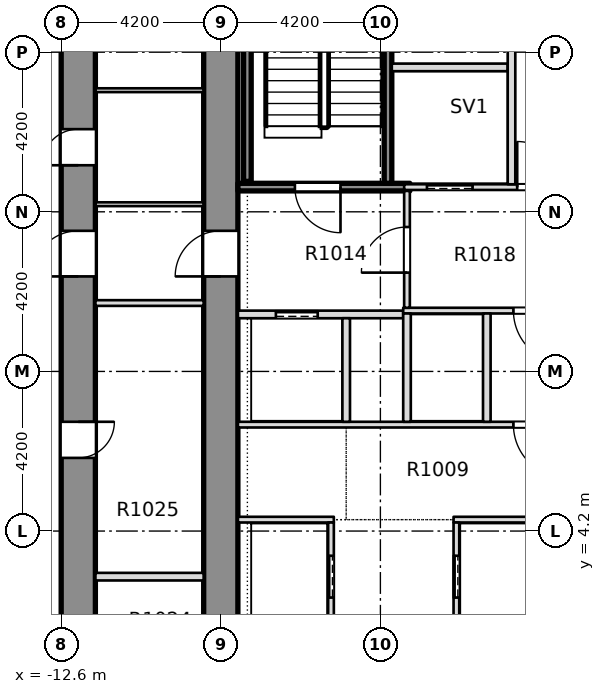
"""IFC4 building model, lengths in metres.
Left out: names, types, materials, properties, quantities, classifications, styles, units other than length and angle.
Written with IfcOpenShell. Run it as: python <this file> out.ifc"""

import sys

from ifc_helpers import new_model, si_unit, direction, frame, frame_2d, origin, place, context, subcontext, project, spatial, rectangle, extrude, element, fill, save


model = new_model("IFC4")
c1 = context("Model", 3, precision=1e-05, world=origin(), true_north=direction((0.0, 1.0)))
c2 = subcontext(c1, "Body", "Model", "MODEL_VIEW")
j1 = project(units=[si_unit("LENGTHUNIT", "METRE"), si_unit("PLANEANGLEUNIT", "RADIAN")], contexts=[c1])
p1 = place(None, origin())
s1 = spatial("IfcSite", under=j1, at=p1, CompositionType="ELEMENT")
p2 = place(p1, origin())
s2 = spatial("IfcBuilding", under=s1, at=p2, CompositionType="ELEMENT")
p3 = place(p2, frame((0.0, 0.0, 48.3)))
s3 = spatial("IfcBuildingStorey", under=s2, at=p3, CompositionType="ELEMENT", Elevation=48.3)
p4 = place(p3, frame((-12.15, -8.4, -0.32), z_axis=(0.0, 0.0, 1.0), x_axis=(0.0, 1.0, 0.0)))
e1 = element("IfcWall", 1, at=p4, inside=s3, PredefinedType="SHEAR", context=c2, shape_type="SweptSolid", body=[
    extrude(rectangle(XDim=30.15, YDim=0.9, at=frame_2d((15.075, 0.0))), origin(), (0.0, 0.0, 1.0), 3.45),
])
p5 = place(p4, frame((3.925, 0.0, 0.32)))
e2 = element("IfcOpeningElement", 2, at=p5, cuts=e1, PredefinedType="OPENING", context=c2, shape_type="SweptSolid", body=[
    extrude(rectangle(XDim=0.95, YDim=2.1, at=frame_2d((0.475, 1.05))), frame((0.0, 0.46, 0.0), z_axis=(0.0, -1.0, 0.0), x_axis=(1.0, 0.0, 0.0)), (0.0, 0.0, 1.0), 0.92),
])
p6 = place(p4, frame((9.175, 0.0, 0.32)))
e3 = element("IfcOpeningElement", 3, at=p6, cuts=e1, PredefinedType="OPENING", context=c2, shape_type="SweptSolid", body=[
    extrude(rectangle(XDim=0.95, YDim=2.1, at=frame_2d((0.475, 1.05))), frame((0.0, 0.46, 0.0), z_axis=(0.0, -1.0, 0.0), x_axis=(1.0, 0.0, 0.0)), (0.0, 0.0, 1.0), 0.92),
])
p7 = place(p4, frame((14.525, 0.0, 0.32)))
e4 = element("IfcOpeningElement", 4, at=p7, cuts=e1, PredefinedType="OPENING", context=c2, shape_type="SweptSolid", body=[
    extrude(rectangle(XDim=0.95, YDim=2.1, at=frame_2d((0.475, 1.05))), frame((0.0, 0.46, 0.0), z_axis=(0.0, -1.0, 0.0), x_axis=(1.0, 0.0, 0.0)), (0.0, 0.0, 1.0), 0.92),
])
p8 = place(p4, frame((22.225, 0.0, 0.32)))
e5 = element("IfcOpeningElement", 5, at=p8, cuts=e1, PredefinedType="OPENING", context=c2, shape_type="SweptSolid", body=[
    extrude(rectangle(XDim=0.95, YDim=2.1, at=frame_2d((0.475, 1.05))), frame((0.0, 0.46, 0.0), z_axis=(0.0, -1.0, 0.0), x_axis=(1.0, 0.0, 0.0)), (0.0, 0.0, 1.0), 0.92),
])
p9 = place(p4, frame((26.25, 0.0, 0.32)))
e6 = element("IfcOpeningElement", 6, at=p9, cuts=e1, PredefinedType="OPENING", context=c2, shape_type="SweptSolid", body=[
    extrude(rectangle(XDim=0.95, YDim=2.1, at=frame_2d((0.475, 1.05))), frame((0.0, 0.46, 0.0), z_axis=(0.0, -1.0, 0.0), x_axis=(1.0, 0.0, 0.0)), (0.0, 0.0, 1.0), 0.92),
])
p10 = place(p4, frame((19.3, 0.0, 0.32)))
e7 = element("IfcOpeningElement", 7, at=p10, cuts=e1, PredefinedType="OPENING", context=c2, shape_type="SweptSolid", body=[
    extrude(rectangle(XDim=1.2, YDim=2.1, at=frame_2d((0.6, 1.05))), frame((0.0, 0.46, 0.0), z_axis=(0.0, -1.0, 0.0), x_axis=(1.0, 0.0, 0.0)), (0.0, 0.0, 1.0), 0.92),
])
p11 = place(p3, frame((-8.4, -7.5, -0.32), z_axis=(0.0, 0.0, 1.0), x_axis=(0.0, 1.0, 0.0)))
e8 = element("IfcWall", 8, at=p11, inside=s3, PredefinedType="SHEAR", context=c2, shape_type="SweptSolid", body=[
    extrude(rectangle(XDim=28.35, YDim=0.9, at=frame_2d((14.175, 0.0))), origin(), (0.0, 0.0, 1.0), 3.45),
])
p12 = place(p11, frame((18.4, 0.0, 0.32)))
e9 = element("IfcOpeningElement", 9, at=p12, cuts=e8, PredefinedType="OPENING", context=c2, shape_type="SweptSolid", body=[
    extrude(rectangle(XDim=1.2, YDim=2.1, at=frame_2d((0.6, 1.05))), frame((0.0, 0.46, 0.0), z_axis=(0.0, -1.0, 0.0), x_axis=(1.0, 0.0, 0.0)), (0.0, 0.0, 1.0), 0.92),
])
p13 = place(p3, frame((-7.949, 4.5, 0.0), z_axis=(0.0, 0.0, 1.0), x_axis=(1.0, 0.0, 0.0)))
e10 = element("IfcWall", 10, at=p13, inside=s3, PredefinedType="PARTITIONING", context=c2, shape_type="SweptSolid", body=[
    extrude(rectangle(XDim=2.524, YDim=0.15, at=frame_2d((1.262, 0.0))), origin(), (0.0, 0.0, 1.0), 3.13),
])
p14 = place(p3, frame((-2.275, 4.5, 0.0), z_axis=(0.0, 0.0, 1.0), x_axis=(1.0, 0.0, 0.0)))
e11 = element("IfcWall", 11, at=p14, inside=s3, PredefinedType="PARTITIONING", context=c2, shape_type="SweptSolid", body=[
    extrude(rectangle(XDim=4.55, YDim=0.15, at=frame_2d((2.275, 0.0))), origin(), (0.0, 0.0, 1.0), 3.13),
])
p15 = place(p3, frame((-7.949, 7.0, 0.0), z_axis=(0.0, 0.0, 1.0), x_axis=(1.0, 0.0, 0.0)))
e12 = element("IfcWall", 12, at=p15, inside=s3, PredefinedType="PARTITIONING", context=c2, shape_type="SweptSolid", body=[
    extrude(rectangle(XDim=15.898, YDim=0.15, at=frame_2d((7.949, 0.0))), origin(), (0.0, 0.0, 1.0), 3.13),
])
p16 = place(p15, frame((7.249, 0.0, 0.0)))
e13 = element("IfcOpeningElement", 13, at=p16, cuts=e12, PredefinedType="OPENING", context=c2, shape_type="SweptSolid", body=[
    extrude(rectangle(XDim=1.4, YDim=2.1, at=frame_2d((0.7, 1.05))), frame((0.0, 0.085, 0.0), z_axis=(0.0, -1.0, 0.0), x_axis=(1.0, 0.0, 0.0)), (0.0, 0.0, 1.0), 0.17),
])
p17 = place(p3, frame((-7.949, 9.9, 0.0), z_axis=(0.0, 0.0, 1.0), x_axis=(1.0, 0.0, 0.0)))
e14 = element("IfcWall", 14, at=p17, inside=s3, PredefinedType="PARTITIONING", context=c2, shape_type="SweptSolid", body=[
    extrude(rectangle(XDim=4.349, YDim=0.2, at=frame_2d((2.174, 0.0))), origin(), (0.0, 0.0, 1.0), 3.13),
])
p18 = place(p17, frame((0.999, 0.0, 0.0)))
e15 = element("IfcOpeningElement", 15, at=p18, cuts=e14, PredefinedType="OPENING", context=c2, shape_type="SweptSolid", body=[
    extrude(rectangle(XDim=1.1, YDim=2.1, at=frame_2d((0.55, 1.05))), frame((0.0, 0.11, 0.0), z_axis=(0.0, -1.0, 0.0), x_axis=(1.0, 0.0, 0.0)), (0.0, 0.0, 1.0), 0.22),
])
p19 = place(p3, frame((-3.6, 10.0, 0.0), z_axis=(0.0, 0.0, 1.0), x_axis=(1.0, 0.0, 0.0)))
e16 = element("IfcWall", 16, at=p19, inside=s3, PredefinedType="PARTITIONING", context=c2, shape_type="SweptSolid", body=[
    extrude(rectangle(XDim=7.2, YDim=0.15, at=frame_2d((3.6, 0.0))), origin(), (0.0, 0.0, 1.0), 3.13),
])
p20 = place(p19, frame((2.9, 0.0, 0.0)))
e17 = element("IfcOpeningElement", 17, at=p20, cuts=e16, PredefinedType="OPENING", context=c2, shape_type="SweptSolid", body=[
    extrude(rectangle(XDim=1.4, YDim=2.1, at=frame_2d((0.7, 1.05))), frame((0.0, 0.085, 0.0), z_axis=(0.0, -1.0, 0.0), x_axis=(1.0, 0.0, 0.0)), (0.0, 0.0, 1.0), 0.17),
])
p21 = place(p3, frame((-7.949, 13.25, 0.0), z_axis=(0.0, 0.0, 1.0), x_axis=(1.0, 0.0, 0.0)))
e18 = element("IfcWall", 18, at=p21, inside=s3, PredefinedType="SOLIDWALL", context=c2, shape_type="SweptSolid", body=[
    extrude(rectangle(XDim=4.524, YDim=0.2, at=frame_2d((2.262, 0.0))), origin(), (0.0, 0.0, 1.0), 3.13),
])
p22 = place(p21, frame((1.499, 0.0, 0.0)))
e19 = element("IfcOpeningElement", 19, at=p22, cuts=e18, PredefinedType="OPENING", context=c2, shape_type="SweptSolid", body=[
    extrude(rectangle(XDim=1.2, YDim=2.1, at=frame_2d((0.6, 1.05))), frame((0.0, 0.11, 0.0), z_axis=(0.0, -1.0, 0.0), x_axis=(1.0, 0.0, 0.0)), (0.0, 0.0, 1.0), 0.22),
])
p23 = place(p3, frame((-3.575, 13.25, 0.0), z_axis=(0.0, 0.0, 1.0), x_axis=(1.0, 0.0, 0.0)))
e20 = element("IfcWall", 20, at=p23, inside=s3, PredefinedType="PARTITIONING", context=c2, shape_type="SweptSolid", body=[
    extrude(rectangle(XDim=7.15, YDim=0.15, at=frame_2d((3.575, 0.0))), origin(), (0.0, 0.0, 1.0), 3.13),
])
p24 = place(p23, frame((0.6, 0.0, 0.0)))
e21 = element("IfcOpeningElement", 21, at=p24, cuts=e20, PredefinedType="OPENING", context=c2, shape_type="SweptSolid", body=[
    extrude(rectangle(XDim=1.2, YDim=2.1, at=frame_2d((0.6, 1.05))), frame((0.0, 0.085, 0.0), z_axis=(0.0, -1.0, 0.0), x_axis=(1.0, 0.0, 0.0)), (0.0, 0.0, 1.0), 0.17),
])
p25 = place(p23, frame((5.4, 0.0, 0.0)))
e22 = element("IfcOpeningElement", 22, at=p25, cuts=e20, PredefinedType="OPENING", context=c2, shape_type="SweptSolid", body=[
    extrude(rectangle(XDim=1.1, YDim=2.1, at=frame_2d((0.55, 1.05))), frame((0.0, 0.085, 0.0), z_axis=(0.0, -1.0, 0.0), x_axis=(1.0, 0.0, 0.0)), (0.0, 0.0, 1.0), 0.17),
])
p26 = place(p23, frame((2.975, 0.0, 0.0)))
e23 = element("IfcOpeningElement", 23, at=p26, cuts=e20, PredefinedType="OPENING", context=c2, shape_type="SweptSolid", body=[
    extrude(rectangle(XDim=1.2, YDim=2.1, at=frame_2d((0.6, 1.05))), frame((0.0, 0.085, 0.0), z_axis=(0.0, -1.0, 0.0), x_axis=(1.0, 0.0, 0.0)), (0.0, 0.0, 1.0), 0.17),
])
p27 = place(p3, frame((-3.9, 16.4, 0.0), z_axis=(0.0, 0.0, 1.0), x_axis=(1.0, 0.0, 0.0)))
e24 = element("IfcWall", 24, at=p27, inside=s3, PredefinedType="PARTITIONING", context=c2, shape_type="SweptSolid", body=[
    extrude(rectangle(XDim=3.05, YDim=0.2, at=frame_2d((1.525, 0.0))), origin(), (0.0, 0.0, 1.0), 3.13),
])
p28 = place(p3, frame((-5.5, -7.499, 0.0), z_axis=(0.0, 0.0, 1.0), x_axis=(0.0, 1.0, 0.0)))
e25 = element("IfcWall", 25, at=p28, inside=s3, PredefinedType="PARTITIONING", context=c2, shape_type="SweptSolid", body=[
    extrude(rectangle(XDim=11.924, YDim=0.15, at=frame_2d((5.962, 0.0))), origin(), (0.0, 0.0, 1.0), 3.13),
])
p29 = place(p28, frame((0.949, 0.0, 0.0)))
e26 = element("IfcOpeningElement", 26, at=p29, cuts=e25, PredefinedType="OPENING", context=c2, shape_type="SweptSolid", body=[
    extrude(rectangle(XDim=1.1, YDim=2.1, at=frame_2d((0.55, 1.05))), frame((0.0, 0.085, 0.0), z_axis=(0.0, -1.0, 0.0), x_axis=(1.0, 0.0, 0.0)), (0.0, 0.0, 1.0), 0.17),
])
p30 = place(p28, frame((3.949, 0.0, 0.0)))
e27 = element("IfcOpeningElement", 27, at=p30, cuts=e25, PredefinedType="OPENING", context=c2, shape_type="SweptSolid", body=[
    extrude(rectangle(XDim=1.1, YDim=2.1, at=frame_2d((0.55, 1.05))), frame((0.0, 0.085, 0.0), z_axis=(0.0, -1.0, 0.0), x_axis=(1.0, 0.0, 0.0)), (0.0, 0.0, 1.0), 0.17),
])
p31 = place(p28, frame((6.949, 0.0, 0.0)))
e28 = element("IfcOpeningElement", 28, at=p31, cuts=e25, PredefinedType="OPENING", context=c2, shape_type="SweptSolid", body=[
    extrude(rectangle(XDim=1.1, YDim=2.1, at=frame_2d((0.55, 1.05))), frame((0.0, 0.085, 0.0), z_axis=(0.0, -1.0, 0.0), x_axis=(1.0, 0.0, 0.0)), (0.0, 0.0, 1.0), 0.17),
])
p32 = place(p28, frame((9.949, 0.0, 0.0)))
e29 = element("IfcOpeningElement", 29, at=p32, cuts=e25, PredefinedType="OPENING", context=c2, shape_type="SweptSolid", body=[
    extrude(rectangle(XDim=1.1, YDim=2.1, at=frame_2d((0.55, 1.05))), frame((0.0, 0.085, 0.0), z_axis=(0.0, -1.0, 0.0), x_axis=(1.0, 0.0, 0.0)), (0.0, 0.0, 1.0), 0.17),
])
p33 = place(p3, frame((-5.1, 7.075, 0.0), z_axis=(0.0, 0.0, 1.0), x_axis=(0.0, 1.0, 0.0)))
e30 = element("IfcWall", 30, at=p33, inside=s3, PredefinedType="PARTITIONING", context=c2, shape_type="SweptSolid", body=[
    extrude(rectangle(XDim=2.725, YDim=0.2, at=frame_2d((1.363, 0.0))), origin(), (0.0, 0.0, 1.0), 3.13),
])
p34 = place(p3, frame((-4.0, 13.35, 0.0), z_axis=(0.0, 0.0, 1.0), x_axis=(0.0, 1.0, 0.0)))
e31 = element("IfcWall", 31, at=p34, inside=s3, PredefinedType="SOLIDWALL", context=c2, shape_type="SweptSolid", body=[
    extrude(rectangle(XDim=7.499, YDim=0.2, at=frame_2d((3.75, 0.0))), origin(), (0.0, 0.0, 1.0), 3.13),
])
p35 = place(p3, frame((-3.5, 7.075, 0.0), z_axis=(0.0, 0.0, 1.0), x_axis=(0.0, 1.0, 0.0)))
e32 = element("IfcWall", 32, at=p35, inside=s3, PredefinedType="PARTITIONING", context=c2, shape_type="SweptSolid", body=[
    extrude(rectangle(XDim=2.85, YDim=0.2, at=frame_2d((1.425, 0.0))), origin(), (0.0, 0.0, 1.0), 3.13),
])
p36 = place(p3, frame((-3.5, 10.075, 0.0), z_axis=(0.0, 0.0, 1.0), x_axis=(0.0, 1.0, 0.0)))
e33 = element("IfcWall", 33, at=p36, inside=s3, PredefinedType="PARTITIONING", context=c2, shape_type="SweptSolid", body=[
    extrude(rectangle(XDim=3.075, YDim=0.15, at=frame_2d((1.538, 0.0))), origin(), (0.0, 0.0, 1.0), 3.13),
])
p37 = place(p36, frame((0.925, 0.0, 0.0)))
e34 = element("IfcOpeningElement", 34, at=p37, cuts=e33, PredefinedType="OPENING", context=c2, shape_type="SweptSolid", body=[
    extrude(rectangle(XDim=1.2, YDim=2.1, at=frame_2d((0.6, 1.05))), frame((0.0, 0.085, 0.0), z_axis=(0.0, -1.0, 0.0), x_axis=(1.0, 0.0, 0.0)), (0.0, 0.0, 1.0), 0.17),
])
p38 = place(p3, frame((-2.2, -7.499, 0.0), z_axis=(0.0, 0.0, 1.0), x_axis=(0.0, 1.0, 0.0)))
e35 = element("IfcWall", 35, at=p38, inside=s3, PredefinedType="PARTITIONING", context=c2, shape_type="SweptSolid", body=[
    extrude(rectangle(XDim=11.924, YDim=0.15, at=frame_2d((5.962, 0.0))), origin(), (0.0, 0.0, 1.0), 3.13),
])
p39 = place(p38, frame((0.949, 0.0, 0.0)))
e36 = element("IfcOpeningElement", 36, at=p39, cuts=e35, PredefinedType="OPENING", context=c2, shape_type="SweptSolid", body=[
    extrude(rectangle(XDim=1.1, YDim=2.1, at=frame_2d((0.55, 1.05))), frame((0.0, 0.085, 0.0), z_axis=(0.0, -1.0, 0.0), x_axis=(1.0, 0.0, 0.0)), (0.0, 0.0, 1.0), 0.17),
])
p40 = place(p38, frame((3.949, 0.0, 0.0)))
e37 = element("IfcOpeningElement", 37, at=p40, cuts=e35, PredefinedType="OPENING", context=c2, shape_type="SweptSolid", body=[
    extrude(rectangle(XDim=1.1, YDim=2.1, at=frame_2d((0.55, 1.05))), frame((0.0, 0.085, 0.0), z_axis=(0.0, -1.0, 0.0), x_axis=(1.0, 0.0, 0.0)), (0.0, 0.0, 1.0), 0.17),
])
p41 = place(p38, frame((6.949, 0.0, 0.0)))
e38 = element("IfcOpeningElement", 38, at=p41, cuts=e35, PredefinedType="OPENING", context=c2, shape_type="SweptSolid", body=[
    extrude(rectangle(XDim=1.1, YDim=2.1, at=frame_2d((0.55, 1.05))), frame((0.0, 0.085, 0.0), z_axis=(0.0, -1.0, 0.0), x_axis=(1.0, 0.0, 0.0)), (0.0, 0.0, 1.0), 0.17),
])
p42 = place(p38, frame((9.949, 0.0, 0.0)))
e39 = element("IfcOpeningElement", 39, at=p42, cuts=e35, PredefinedType="OPENING", context=c2, shape_type="SweptSolid", body=[
    extrude(rectangle(XDim=1.1, YDim=2.1, at=frame_2d((0.55, 1.05))), frame((0.0, 0.085, 0.0), z_axis=(0.0, -1.0, 0.0), x_axis=(1.0, 0.0, 0.0)), (0.0, 0.0, 1.0), 0.17),
])
p43 = place(p3, frame((-1.4, 7.075, 0.0), z_axis=(0.0, 0.0, 1.0), x_axis=(0.0, 1.0, 0.0)))
e40 = element("IfcWall", 40, at=p43, inside=s3, PredefinedType="PARTITIONING", context=c2, shape_type="SweptSolid", body=[
    extrude(rectangle(XDim=2.85, YDim=0.2, at=frame_2d((1.425, 0.0))), origin(), (0.0, 0.0, 1.0), 3.13),
])
p44 = place(p3, frame((-0.75, 13.325, 0.0), z_axis=(0.0, 0.0, 1.0), x_axis=(0.0, 1.0, 0.0)))
e41 = element("IfcWall", 41, at=p44, inside=s3, PredefinedType="PARTITIONING", context=c2, shape_type="SweptSolid", body=[
    extrude(rectangle(XDim=7.524, YDim=0.2, at=frame_2d((3.762, 0.0))), origin(), (0.0, 0.0, 1.0), 3.13),
])
p45 = place(p44, frame((4.8, 0.0, 0.0)))
e42 = element("IfcOpeningElement", 42, at=p45, cuts=e41, PredefinedType="OPENING", context=c2, shape_type="SweptSolid", body=[
    extrude(rectangle(XDim=0.95, YDim=2.1, at=frame_2d((0.475, 1.05))), frame((0.0, 0.11, 0.0), z_axis=(0.0, -1.0, 0.0), x_axis=(1.0, 0.0, 0.0)), (0.0, 0.0, 1.0), 0.22),
])
p46 = place(p3, frame((-11.699, 3.0, 0.0), z_axis=(0.0, 0.0, 1.0), x_axis=(1.0, 0.0, 0.0)))
e43 = element("IfcWall", 43, at=p46, inside=s3, PredefinedType="PARTITIONING", context=c2, shape_type="SweptSolid", body=[
    extrude(rectangle(XDim=2.848, YDim=0.2, at=frame_2d((1.424, 0.0))), origin(), (0.0, 0.0, 1.0), 3.13),
])
p47 = place(p3, frame((-11.699, 10.2, 0.0), z_axis=(0.0, 0.0, 1.0), x_axis=(1.0, 0.0, 0.0)))
e44 = element("IfcWall", 44, at=p47, inside=s3, PredefinedType="PARTITIONING", context=c2, shape_type="SweptSolid", body=[
    extrude(rectangle(XDim=2.848, YDim=0.15, at=frame_2d((1.424, 0.0))), origin(), (0.0, 0.0, 1.0), 3.13),
])
for number, where, z_axis, x_axis in (
    (45, (-11.699, 12.8, 0.0), (0.0, 0.0, 1.0), (1.0, 0.0, 0.0)),
    (46, (-11.699, 15.8, 0.0), (0.0, 0.0, 1.0), (1.0, 0.0, 0.0)),
):
    element("IfcWall", number, at=place(p3, frame(where, z_axis=z_axis, x_axis=x_axis)), inside=s3, PredefinedType="PARTITIONING", context=c2, shape_type="SweptSolid", body=[
        extrude(rectangle(XDim=2.848, YDim=0.1, at=frame_2d((1.424, 0.0))), origin(), (0.0, 0.0, 1.0), 3.13),
    ])
p48 = place(p3, frame((-7.7, 13.4, 0.0), z_axis=(0.0, 0.0, 1.0), x_axis=(0.0, 1.0, 0.0)))
e47 = element("IfcWall", 47, at=p48, inside=s3, PredefinedType="SOLIDWALL", context=c2, shape_type="SweptSolid", body=[
    extrude(rectangle(XDim=7.4, YDim=0.2, at=frame_2d((3.7, 0.0))), origin(), (0.0, 0.0, 1.0), 3.13),
])
p49 = place(p32, origin())
e48 = element("IfcDoor", 48, at=p49, inside=s3, OperationType="SLIDING_TO_RIGHT", PredefinedType="DOOR", context=c2, shape_type="SweptSolid", body=[
    extrude(rectangle(XDim=1.1, YDim=2.1, at=frame_2d((0.55, 1.05))), frame((0.0, 0.025, 0.0), z_axis=(0.0, -1.0, 0.0), x_axis=(1.0, 0.0, 0.0)), (0.0, 0.0, 1.0), 0.05),
])
fill(e29, e48)
p50 = place(p42, origin())
e49 = element("IfcDoor", 49, at=p50, inside=s3, OperationType="SLIDING_TO_RIGHT", PredefinedType="DOOR", context=c2, shape_type="SweptSolid", body=[
    extrude(rectangle(XDim=1.1, YDim=2.1, at=frame_2d((0.55, 1.05))), frame((0.0, 0.025, 0.0), z_axis=(0.0, -1.0, 0.0), x_axis=(1.0, 0.0, 0.0)), (0.0, 0.0, 1.0), 0.05),
])
fill(e39, e49)
p51 = place(p22, origin())
e50 = element("IfcDoor", 50, at=p51, inside=s3, OperationType="SINGLE_SWING_LEFT", PredefinedType="DOOR", context=c2, shape_type="SweptSolid", body=[
    extrude(rectangle(XDim=1.2, YDim=2.1, at=frame_2d((0.6, 1.05))), frame((0.0, 0.025, 0.0), z_axis=(0.0, -1.0, 0.0), x_axis=(1.0, 0.0, 0.0)), (0.0, 0.0, 1.0), 0.05),
])
fill(e19, e50)
p52 = place(p18, origin())
e51 = element("IfcDoor", 51, at=p52, inside=s3, OperationType="SLIDING_TO_RIGHT", PredefinedType="DOOR", context=c2, shape_type="SweptSolid", body=[
    extrude(rectangle(XDim=1.1, YDim=2.1, at=frame_2d((0.55, 1.05))), frame((0.0, 0.025, 0.0), z_axis=(0.0, -1.0, 0.0), x_axis=(1.0, 0.0, 0.0)), (0.0, 0.0, 1.0), 0.05),
])
fill(e15, e51)
p53 = place(p16, origin())
e52 = element("IfcDoor", 52, at=p53, inside=s3, OperationType="SINGLE_SWING_RIGHT", PredefinedType="DOOR", context=c2, shape_type="SweptSolid", body=[
    extrude(rectangle(XDim=1.4, YDim=2.1, at=frame_2d((0.7, 1.05))), frame((0.0, 0.025, 0.0), z_axis=(0.0, -1.0, 0.0), x_axis=(1.0, 0.0, 0.0)), (0.0, 0.0, 1.0), 0.05),
])
fill(e13, e52)
p54 = place(p20, origin())
e53 = element("IfcDoor", 53, at=p54, inside=s3, OperationType="SINGLE_SWING_RIGHT", PredefinedType="DOOR", context=c2, shape_type="SweptSolid", body=[
    extrude(rectangle(XDim=1.4, YDim=2.1, at=frame_2d((0.7, 1.05))), frame((0.0, 0.025, 0.0), z_axis=(0.0, -1.0, 0.0), x_axis=(1.0, 0.0, 0.0)), (0.0, 0.0, 1.0), 0.05),
])
fill(e17, e53)
p55 = place(p24, origin())
e54 = element("IfcDoor", 54, at=p55, inside=s3, OperationType="SLIDING_TO_RIGHT", PredefinedType="DOOR", context=c2, shape_type="SweptSolid", body=[
    extrude(rectangle(XDim=1.2, YDim=2.1, at=frame_2d((0.6, 1.05))), frame((0.0, 0.025, 0.0), z_axis=(0.0, -1.0, 0.0), x_axis=(1.0, 0.0, 0.0)), (0.0, 0.0, 1.0), 0.05),
])
fill(e21, e54)
p56 = place(p26, origin())
e55 = element("IfcDoor", 55, at=p56, inside=s3, OperationType="SINGLE_SWING_RIGHT", PredefinedType="DOOR", context=c2, shape_type="SweptSolid", body=[
    extrude(rectangle(XDim=1.2, YDim=2.1, at=frame_2d((0.6, 1.05))), frame((0.0, 0.025, 0.0), z_axis=(0.0, -1.0, 0.0), x_axis=(1.0, 0.0, 0.0)), (0.0, 0.0, 1.0), 0.05),
])
fill(e23, e55)
p57 = place(p37, origin())
e56 = element("IfcDoor", 56, at=p57, inside=s3, OperationType="SINGLE_SWING_RIGHT", PredefinedType="DOOR", context=c2, shape_type="SweptSolid", body=[
    extrude(rectangle(XDim=1.2, YDim=2.1, at=frame_2d((0.6, 1.05))), frame((0.0, 0.025, 0.0), z_axis=(0.0, -1.0, 0.0), x_axis=(1.0, 0.0, 0.0)), (0.0, 0.0, 1.0), 0.05),
])
fill(e34, e56)
p58 = place(p7, origin())
e57 = element("IfcDoor", 57, at=p58, inside=s3, OperationType="SINGLE_SWING_LEFT", PredefinedType="DOOR", context=c2, shape_type="SweptSolid", body=[
    extrude(rectangle(XDim=0.95, YDim=2.1, at=frame_2d((0.475, 1.05))), frame((0.0, 0.025, 0.0), z_axis=(0.0, -1.0, 0.0), x_axis=(1.0, 0.0, 0.0)), (0.0, 0.0, 1.0), 0.05),
])
fill(e4, e57)
p59 = place(p8, origin())
e58 = element("IfcDoor", 58, at=p59, inside=s3, OperationType="SINGLE_SWING_LEFT", PredefinedType="DOOR", context=c2, shape_type="SweptSolid", body=[
    extrude(rectangle(XDim=0.95, YDim=2.1, at=frame_2d((0.475, 1.05))), frame((0.0, 0.025, 0.0), z_axis=(0.0, -1.0, 0.0), x_axis=(1.0, 0.0, 0.0)), (0.0, 0.0, 1.0), 0.05),
])
fill(e5, e58)
p60 = place(p10, origin())
e59 = element("IfcDoor", 59, at=p60, inside=s3, OperationType="SINGLE_SWING_LEFT", PredefinedType="DOOR", context=c2, shape_type="SweptSolid", body=[
    extrude(rectangle(XDim=1.2, YDim=2.1, at=frame_2d((0.6, 1.05))), frame((0.0, 0.025, 0.0), z_axis=(0.0, -1.0, 0.0), x_axis=(1.0, 0.0, 0.0)), (0.0, 0.0, 1.0), 0.05),
])
fill(e7, e59)
p61 = place(p12, origin())
e60 = element("IfcDoor", 60, at=p61, inside=s3, OperationType="SINGLE_SWING_LEFT", PredefinedType="DOOR", context=c2, shape_type="SweptSolid", body=[
    extrude(rectangle(XDim=1.2, YDim=2.1, at=frame_2d((0.6, 1.05))), frame((0.0, 0.025, 0.0), z_axis=(0.0, -1.0, 0.0), x_axis=(1.0, 0.0, 0.0)), (0.0, 0.0, 1.0), 0.05),
])
fill(e9, e60)
save(model, sys.argv[1])
